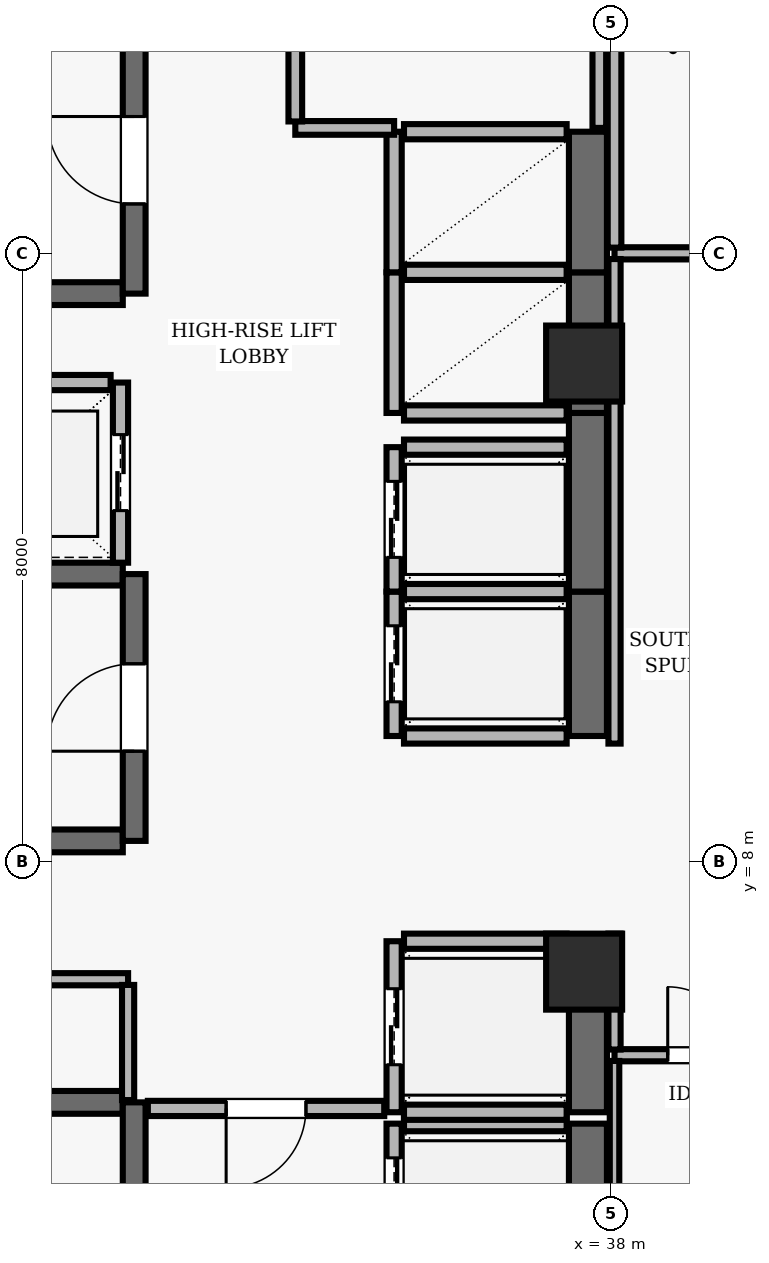
"""IFC4 building model, lengths in metres.
Left out: names, types, materials, properties, quantities, classifications, styles, units other than length and angle.
Written with IfcOpenShell. Run it as: python <this file> out.ifc"""

import sys

from ifc_helpers import new_model, si_unit, direction, frame, frame_2d, origin, origin_2d, place, context, subcontext, project, spatial, rectangle, extrude, element, fill, save


model = new_model("IFC4")
c1 = context("Model", 3, precision=1e-05, world=origin(), true_north=direction((0.0, 1.0)))
c2 = subcontext(c1, "Body", "Model", "MODEL_VIEW")
j1 = project(units=[si_unit("LENGTHUNIT", "METRE"), si_unit("PLANEANGLEUNIT", "RADIAN")], contexts=[c1])
p1 = place(None, origin())
s1 = spatial("IfcSite", under=j1, at=p1, CompositionType="ELEMENT")
p2 = place(p1, origin())
s2 = spatial("IfcBuilding", under=s1, at=p2, CompositionType="ELEMENT")
p3 = place(p2, frame((0.0, 0.0, 214.8)))
s3 = spatial("IfcBuildingStorey", under=s2, at=p3, CompositionType="ELEMENT", Elevation=214.8)
for number, where, z_axis, x_axis in (
    (1, (37.65, 6.55, 0.0), (0.0, 0.0, 1.0), (1.0, 0.0, 0.0)),
    (2, (37.65, 14.55, 0.0), (0.0, 0.0, 1.0), (1.0, 0.0, 0.0)),
):
    element("IfcColumn", number, at=place(p3, frame(where, z_axis=z_axis, x_axis=x_axis)), inside=s3, PredefinedType="COLUMN", context=c2, shape_type="SweptSolid", body=[
        extrude(rectangle(XDim=1.0, YDim=1.0, at=origin_2d()), origin(), (0.0, 0.0, 1.0), 3.9),
    ])
p4 = place(p3, frame((31.58, 4.83, 0.0), z_axis=(0.0, 0.0, 1.0), x_axis=(-1.0, 0.0, 0.0)))
e3 = element("IfcWall", 3, at=p4, inside=s3, PredefinedType="SHEAR", context=c2, shape_type="SweptSolid", body=[
    extrude(rectangle(XDim=8.36, YDim=0.3, at=frame_2d((4.18, 0.0))), origin(), (0.0, 0.0, 1.0), 3.69),
])
p5 = place(p3, frame((31.73, 0.96, 0.0), z_axis=(0.0, 0.0, 1.0), x_axis=(0.0, 1.0, 0.0)))
e4 = element("IfcWall", 4, at=p5, inside=s3, PredefinedType="SHEAR", context=c2, shape_type="SweptSolid", body=[
    extrude(rectangle(XDim=3.87, YDim=0.3, at=frame_2d((1.935, 0.0))), origin(), (0.0, 0.0, 1.0), 3.69),
])
p6 = place(p5, frame((1.54, 0.0, 0.0)))
e5 = element("IfcOpeningElement", 5, at=p6, cuts=e4, PredefinedType="OPENING", context=c2, shape_type="SweptSolid", body=[
    extrude(rectangle(XDim=1.15, YDim=2.15, at=frame_2d((0.575, 1.075))), frame((0.0, 0.16, 0.0), z_axis=(0.0, -1.0, 0.0), x_axis=(1.0, 0.0, 0.0)), (0.0, 0.0, 1.0), 0.32),
])
p7 = place(p3, frame((23.22, 15.47, 0.0), z_axis=(0.0, 0.0, 1.0), x_axis=(1.0, 0.0, 0.0)))
e6 = element("IfcWall", 6, at=p7, inside=s3, PredefinedType="SHEAR", context=c2, shape_type="SweptSolid", body=[
    extrude(rectangle(XDim=8.36, YDim=0.3, at=frame_2d((4.18, 0.0))), origin(), (0.0, 0.0, 1.0), 3.69),
])
p8 = place(p3, frame((31.73, 15.47, 0.0), z_axis=(0.0, 0.0, 1.0), x_axis=(0.0, 1.0, 0.0)))
e7 = element("IfcWall", 7, at=p8, inside=s3, PredefinedType="SHEAR", context=c2, shape_type="SweptSolid", body=[
    extrude(rectangle(XDim=3.51, YDim=0.3, at=frame_2d((1.755, 0.0))), origin(), (0.0, 0.0, 1.0), 3.69),
])
p9 = place(p8, frame((1.18, 0.0, 0.0)))
e8 = element("IfcOpeningElement", 8, at=p9, cuts=e7, PredefinedType="OPENING", context=c2, shape_type="SweptSolid", body=[
    extrude(rectangle(XDim=1.15, YDim=2.15, at=frame_2d((0.575, 1.075))), frame((0.0, 0.16, 0.0), z_axis=(0.0, -1.0, 0.0), x_axis=(1.0, 0.0, 0.0)), (0.0, 0.0, 1.0), 0.32),
])
for number, where, z_axis, x_axis in (
    (9, (31.58, 11.78, 0.0), (0.0, 0.0, 1.0), (-1.0, 0.0, 0.0)),
    (10, (23.22, 8.27, 0.0), (0.0, 0.0, 1.0), (1.0, 0.0, 0.0)),
):
    element("IfcWall", number, at=place(p3, frame(where, z_axis=z_axis, x_axis=x_axis)), inside=s3, PredefinedType="SHEAR", context=c2, shape_type="SweptSolid", body=[
        extrude(rectangle(XDim=8.36, YDim=0.3, at=frame_2d((4.18, 0.0))), origin(), (0.0, 0.0, 1.0), 3.69),
    ])
p10 = place(p3, frame((31.73, 8.27, 0.0), z_axis=(0.0, 0.0, 1.0), x_axis=(0.0, 1.0, 0.0)))
e11 = element("IfcWall", 11, at=p10, inside=s3, PredefinedType="SHEAR", context=c2, shape_type="SweptSolid", body=[
    extrude(rectangle(XDim=3.51, YDim=0.3, at=frame_2d((1.755, 0.0))), origin(), (0.0, 0.0, 1.0), 3.69),
])
p11 = place(p10, frame((1.18, 0.0, 0.0)))
e12 = element("IfcOpeningElement", 12, at=p11, cuts=e11, PredefinedType="OPENING", context=c2, shape_type="SweptSolid", body=[
    extrude(rectangle(XDim=1.15, YDim=2.15, at=frame_2d((0.575, 1.075))), frame((0.0, 0.16, 0.0), z_axis=(0.0, -1.0, 0.0), x_axis=(1.0, 0.0, 0.0)), (0.0, 0.0, 1.0), 0.32),
])
p12 = place(p3, frame((35.15, 4.55, 0.0), z_axis=(0.0, 0.0, 1.0), x_axis=(0.0, -1.0, 0.0)))
e13 = element("IfcWall", 13, at=p12, inside=s3, PredefinedType="SOLIDWALL", context=c2, shape_type="SweptSolid", body=[
    extrude(rectangle(XDim=2.1, YDim=0.2, at=frame_2d((1.05, 0.0))), origin(), (0.0, 0.0, 1.0), 3.69),
])
p13 = place(p12, frame((0.45, 0.0, 0.0)))
e14 = element("IfcOpeningElement", 14, at=p13, cuts=e13, PredefinedType="OPENING", context=c2, shape_type="SweptSolid", body=[
    extrude(rectangle(XDim=1.2, YDim=2.15, at=frame_2d((0.6, 1.075))), frame((0.0, 0.11, 0.0), z_axis=(0.0, -1.0, 0.0), x_axis=(1.0, 0.0, 0.0)), (0.0, 0.0, 1.0), 0.22),
])
p14 = place(p3, frame((37.7, 2.45, 0.0), z_axis=(0.0, 0.0, 1.0), x_axis=(0.0, 1.0, 0.0)))
e15 = element("IfcWall", 15, at=p14, inside=s3, PredefinedType="SHEAR", context=c2, shape_type="SweptSolid", body=[
    extrude(rectangle(XDim=2.1, YDim=0.5, at=frame_2d((1.05, 0.0))), origin(), (0.0, 0.0, 1.0), 3.69),
])
p15 = place(p3, frame((37.42, 4.55, 0.0), z_axis=(0.0, 0.0, 1.0), x_axis=(-1.0, 0.0, 0.0)))
e16 = element("IfcWall", 16, at=p15, inside=s3, PredefinedType="SOLIDWALL", context=c2, shape_type="SweptSolid", body=[
    extrude(rectangle(XDim=2.14, YDim=0.2, at=frame_2d((1.07, 0.0))), origin(), (0.0, 0.0, 1.0), 3.69),
])
p16 = place(p3, frame((35.15, 6.95, 0.0), z_axis=(0.0, 0.0, 1.0), x_axis=(0.0, -1.0, 0.0)))
e17 = element("IfcWall", 17, at=p16, inside=s3, PredefinedType="SOLIDWALL", context=c2, shape_type="SweptSolid", body=[
    extrude(rectangle(XDim=2.25, YDim=0.2, at=frame_2d((1.125, 0.0))), origin(), (0.0, 0.0, 1.0), 3.69),
])
p17 = place(p16, frame((0.625, 0.0, 0.0)))
e18 = element("IfcOpeningElement", 18, at=p17, cuts=e17, PredefinedType="OPENING", context=c2, shape_type="SweptSolid", body=[
    extrude(rectangle(XDim=1.0, YDim=2.1, at=frame_2d((0.5, 1.05))), frame((0.0, 0.11, 0.0), z_axis=(0.0, -1.0, 0.0), x_axis=(1.0, 0.0, 0.0)), (0.0, 0.0, 1.0), 0.22),
])
p18 = place(p3, frame((37.7, 4.7, 0.0), z_axis=(0.0, 0.0, 1.0), x_axis=(0.0, 1.0, 0.0)))
e19 = element("IfcWall", 19, at=p18, inside=s3, PredefinedType="SHEAR", context=c2, shape_type="SweptSolid", body=[
    extrude(rectangle(XDim=2.25, YDim=0.5, at=frame_2d((1.125, 0.0))), origin(), (0.0, 0.0, 1.0), 3.69),
])
for number, where, z_axis, x_axis in (
    (20, (35.28, 4.7, 0.0), (0.0, 0.0, 1.0), (1.0, 0.0, 0.0)),
    (21, (37.42, 6.95, 0.0), (0.0, 0.0, 1.0), (-1.0, 0.0, 0.0)),
):
    element("IfcWall", number, at=place(p3, frame(where, z_axis=z_axis, x_axis=x_axis)), inside=s3, PredefinedType="SOLIDWALL", context=c2, shape_type="SweptSolid", body=[
        extrude(rectangle(XDim=2.14, YDim=0.2, at=frame_2d((1.07, 0.0))), origin(), (0.0, 0.0, 1.0), 3.69),
    ])
p19 = place(p3, frame((35.15, 11.55, 0.0), z_axis=(0.0, 0.0, 1.0), x_axis=(0.0, -1.0, 0.0)))
e22 = element("IfcWall", 22, at=p19, inside=s3, PredefinedType="SOLIDWALL", context=c2, shape_type="SweptSolid", body=[
    extrude(rectangle(XDim=1.9, YDim=0.2, at=frame_2d((0.95, 0.0))), origin(), (0.0, 0.0, 1.0), 3.69),
])
p20 = place(p19, frame((0.45, 0.0, 0.0)))
e23 = element("IfcOpeningElement", 23, at=p20, cuts=e22, PredefinedType="OPENING", context=c2, shape_type="SweptSolid", body=[
    extrude(rectangle(XDim=1.0, YDim=2.1, at=frame_2d((0.5, 1.05))), frame((0.0, 0.11, 0.0), z_axis=(0.0, -1.0, 0.0), x_axis=(1.0, 0.0, 0.0)), (0.0, 0.0, 1.0), 0.22),
])
p21 = place(p3, frame((37.7, 9.65, 0.0), z_axis=(0.0, 0.0, 1.0), x_axis=(0.0, 1.0, 0.0)))
e24 = element("IfcWall", 24, at=p21, inside=s3, PredefinedType="SHEAR", context=c2, shape_type="SweptSolid", body=[
    extrude(rectangle(XDim=1.9, YDim=0.5, at=frame_2d((0.95, 0.0))), origin(), (0.0, 0.0, 1.0), 3.69),
])
for number, where, z_axis, x_axis in (
    (25, (35.28, 9.65, 0.0), (0.0, 0.0, 1.0), (1.0, 0.0, 0.0)),
    (26, (37.42, 11.55, 0.0), (0.0, 0.0, 1.0), (-1.0, 0.0, 0.0)),
):
    element("IfcWall", number, at=place(p3, frame(where, z_axis=z_axis, x_axis=x_axis)), inside=s3, PredefinedType="SOLIDWALL", context=c2, shape_type="SweptSolid", body=[
        extrude(rectangle(XDim=2.14, YDim=0.2, at=frame_2d((1.07, 0.0))), origin(), (0.0, 0.0, 1.0), 3.69),
    ])
p22 = place(p3, frame((35.15, 13.45, 0.0), z_axis=(0.0, 0.0, 1.0), x_axis=(0.0, -1.0, 0.0)))
e27 = element("IfcWall", 27, at=p22, inside=s3, PredefinedType="SOLIDWALL", context=c2, shape_type="SweptSolid", body=[
    extrude(rectangle(XDim=1.9, YDim=0.2, at=frame_2d((0.95, 0.0))), origin(), (0.0, 0.0, 1.0), 3.69),
])
p23 = place(p22, frame((0.45, 0.0, 0.0)))
e28 = element("IfcOpeningElement", 28, at=p23, cuts=e27, PredefinedType="OPENING", context=c2, shape_type="SweptSolid", body=[
    extrude(rectangle(XDim=1.0, YDim=2.1, at=frame_2d((0.5, 1.05))), frame((0.0, 0.11, 0.0), z_axis=(0.0, -1.0, 0.0), x_axis=(1.0, 0.0, 0.0)), (0.0, 0.0, 1.0), 0.22),
])
p24 = place(p3, frame((37.7, 11.55, 0.0), z_axis=(0.0, 0.0, 1.0), x_axis=(0.0, 1.0, 0.0)))
e29 = element("IfcWall", 29, at=p24, inside=s3, PredefinedType="SHEAR", context=c2, shape_type="SweptSolid", body=[
    extrude(rectangle(XDim=2.35, YDim=0.5, at=frame_2d((1.175, 0.0))), origin(), (0.0, 0.0, 1.0), 3.69),
])
p25 = place(p3, frame((37.42, 13.45, 0.0), z_axis=(0.0, 0.0, 1.0), x_axis=(-1.0, 0.0, 0.0)))
e30 = element("IfcWall", 30, at=p25, inside=s3, PredefinedType="SOLIDWALL", context=c2, shape_type="SweptSolid", body=[
    extrude(rectangle(XDim=2.14, YDim=0.2, at=frame_2d((1.07, 0.0))), origin(), (0.0, 0.0, 1.0), 3.69),
])
p26 = place(p3, frame((31.55, 11.93, 0.0), z_axis=(0.0, 0.0, 1.0), x_axis=(0.0, 1.0, 0.0)))
e31 = element("IfcWall", 31, at=p26, inside=s3, PredefinedType="SOLIDWALL", context=c2, shape_type="SweptSolid", body=[
    extrude(rectangle(XDim=2.37, YDim=0.2, at=frame_2d((1.185, 0.0))), origin(), (0.0, 0.0, 1.0), 3.69),
])
p27 = place(p26, frame((0.685, 0.0, 0.0)))
e32 = element("IfcOpeningElement", 32, at=p27, cuts=e31, PredefinedType="OPENING", context=c2, shape_type="SweptSolid", body=[
    extrude(rectangle(XDim=1.0, YDim=2.1, at=frame_2d((0.5, 1.05))), frame((0.0, 0.11, 0.0), z_axis=(0.0, -1.0, 0.0), x_axis=(1.0, 0.0, 0.0)), (0.0, 0.0, 1.0), 0.22),
])
p28 = place(p3, frame((31.42, 14.3, 0.0), z_axis=(0.0, 0.0, 1.0), x_axis=(-1.0, 0.0, 0.0)))
e33 = element("IfcWall", 33, at=p28, inside=s3, PredefinedType="SOLIDWALL", context=c2, shape_type="SweptSolid", body=[
    extrude(rectangle(XDim=2.44, YDim=0.2, at=frame_2d((1.22, 0.0))), origin(), (0.0, 0.0, 1.0), 3.69),
])
p29 = place(p3, frame((35.15, 15.75, 0.0), z_axis=(0.0, 0.0, 1.0), x_axis=(0.0, -1.0, 0.0)))
e34 = element("IfcWall", 34, at=p29, inside=s3, PredefinedType="SOLIDWALL", context=c2, shape_type="SweptSolid", body=[
    extrude(rectangle(XDim=1.85, YDim=0.2, at=frame_2d((0.925, 0.0))), origin(), (0.0, 0.0, 1.0), 3.69),
])
p30 = place(p3, frame((37.7, 13.9, 0.0), z_axis=(0.0, 0.0, 1.0), x_axis=(0.0, 1.0, 0.0)))
e35 = element("IfcWall", 35, at=p30, inside=s3, PredefinedType="SHEAR", context=c2, shape_type="SweptSolid", body=[
    extrude(rectangle(XDim=1.85, YDim=0.5, at=frame_2d((0.925, 0.0))), origin(), (0.0, 0.0, 1.0), 3.69),
])
for number, where, z_axis, x_axis in (
    (36, (35.28, 13.9, 0.0), (0.0, 0.0, 1.0), (1.0, 0.0, 0.0)),
    (37, (37.42, 15.75, 0.0), (0.0, 0.0, 1.0), (-1.0, 0.0, 0.0)),
):
    element("IfcWall", number, at=place(p3, frame(where, z_axis=z_axis, x_axis=x_axis)), inside=s3, PredefinedType="SOLIDWALL", context=c2, shape_type="SweptSolid", body=[
        extrude(rectangle(XDim=2.14, YDim=0.2, at=frame_2d((1.07, 0.0))), origin(), (0.0, 0.0, 1.0), 3.69),
    ])
p31 = place(p3, frame((35.15, 17.6, 0.0), z_axis=(0.0, 0.0, 1.0), x_axis=(0.0, -1.0, 0.0)))
e38 = element("IfcWall", 38, at=p31, inside=s3, PredefinedType="SOLIDWALL", context=c2, shape_type="SweptSolid", body=[
    extrude(rectangle(XDim=1.85, YDim=0.2, at=frame_2d((0.925, 0.0))), origin(), (0.0, 0.0, 1.0), 3.69),
])
p32 = place(p3, frame((37.7, 15.75, 0.0), z_axis=(0.0, 0.0, 1.0), x_axis=(0.0, 1.0, 0.0)))
e39 = element("IfcWall", 39, at=p32, inside=s3, PredefinedType="SHEAR", context=c2, shape_type="SweptSolid", body=[
    extrude(rectangle(XDim=1.85, YDim=0.5, at=frame_2d((0.925, 0.0))), origin(), (0.0, 0.0, 1.0), 3.69),
])
p33 = place(p3, frame((37.42, 17.6, 0.0), z_axis=(0.0, 0.0, 1.0), x_axis=(-1.0, 0.0, 0.0)))
e40 = element("IfcWall", 40, at=p33, inside=s3, PredefinedType="SOLIDWALL", context=c2, shape_type="SweptSolid", body=[
    extrude(rectangle(XDim=2.14, YDim=0.2, at=frame_2d((1.07, 0.0))), origin(), (0.0, 0.0, 1.0), 3.69),
])
p34 = place(p3, frame((28.55, 6.45, 0.0), z_axis=(0.0, 0.0, 1.0), x_axis=(1.0, 0.0, 0.0)))
e41 = element("IfcWall", 41, at=p34, inside=s3, PredefinedType="PARTITIONING", context=c2, shape_type="SweptSolid", body=[
    extrude(rectangle(XDim=3.1, YDim=0.16, at=frame_2d((1.55, 0.0))), origin(), (0.0, 0.0, 1.0), 3.69),
])
p35 = place(p34, frame((1.11, 0.0, 0.0)))
e42 = element("IfcOpeningElement", 42, at=p35, cuts=e41, PredefinedType="OPENING", context=c2, shape_type="SweptSolid", body=[
    extrude(rectangle(XDim=0.88, YDim=2.1, at=frame_2d((0.44, 1.05))), frame((0.0, 0.09, 0.0), z_axis=(0.0, -1.0, 0.0), x_axis=(1.0, 0.0, 0.0)), (0.0, 0.0, 1.0), 0.18),
])
p36 = place(p3, frame((33.85, 17.65, 0.0), z_axis=(0.0, 0.0, 1.0), x_axis=(1.0, 0.0, 0.0)))
e43 = element("IfcWall", 43, at=p36, inside=s3, PredefinedType="PARTITIONING", context=c2, shape_type="SweptSolid", body=[
    extrude(rectangle(XDim=1.3, YDim=0.18, at=frame_2d((0.65, 0.0))), origin(), (0.0, 0.0, 1.0), 3.69),
])
p37 = place(p3, frame((35.02, 4.75, 0.0), z_axis=(0.0, 0.0, 1.0), x_axis=(-1.0, 0.0, 0.0)))
e44 = element("IfcWall", 44, at=p37, inside=s3, PredefinedType="SOLIDWALL", context=c2, shape_type="SweptSolid", body=[
    extrude(rectangle(XDim=3.11, YDim=0.2, at=frame_2d((1.555, 0.0))), origin(), (0.0, 0.0, 1.0), 3.69),
])
p38 = place(p37, frame((1.03, 0.0, 0.0)))
e45 = element("IfcOpeningElement", 45, at=p38, cuts=e44, PredefinedType="OPENING", context=c2, shape_type="SweptSolid", body=[
    extrude(rectangle(XDim=1.05, YDim=2.15, at=frame_2d((0.525, 1.075))), frame((0.0, 0.11, 0.0), z_axis=(0.0, -1.0, 0.0), x_axis=(1.0, 0.0, 0.0)), (0.0, 0.0, 1.0), 0.22),
])
p39 = place(p3, frame((38.05, 5.45, 0.0), z_axis=(0.0, 0.0, 1.0), x_axis=(1.0, 0.0, 0.0)))
e46 = element("IfcWall", 46, at=p39, inside=s3, PredefinedType="PARTITIONING", context=c2, shape_type="SweptSolid", body=[
    extrude(rectangle(XDim=2.3, YDim=0.16, at=frame_2d((1.15, 0.0))), origin(), (0.0, 0.0, 1.0), 3.343),
])
p40 = place(p39, frame((0.7, 0.0, 0.0)))
e47 = element("IfcOpeningElement", 47, at=p40, cuts=e46, PredefinedType="OPENING", context=c2, shape_type="SweptSolid", body=[
    extrude(rectangle(XDim=0.9, YDim=2.1, at=frame_2d((0.45, 1.05))), frame((0.0, 0.09, 0.0), z_axis=(0.0, -1.0, 0.0), x_axis=(1.0, 0.0, 0.0)), (0.0, 0.0, 1.0), 0.18),
])
p41 = place(p3, frame((40.35, 16.0, 0.0), z_axis=(0.0, 0.0, 1.0), x_axis=(-1.0, 0.0, 0.0)))
e48 = element("IfcWall", 48, at=p41, inside=s3, PredefinedType="PARTITIONING", context=c2, shape_type="SweptSolid", body=[
    extrude(rectangle(XDim=2.3, YDim=0.16, at=frame_2d((1.15, 0.0))), origin(), (0.0, 0.0, 1.0), 3.39),
])
p42 = place(p41, frame((0.35, 0.0, 0.0)))
e49 = element("IfcOpeningElement", 49, at=p42, cuts=e48, PredefinedType="OPENING", context=c2, shape_type="SweptSolid", body=[
    extrude(rectangle(XDim=0.9, YDim=2.1, at=frame_2d((0.45, 1.05))), frame((0.0, 0.09, 0.0), z_axis=(0.0, -1.0, 0.0), x_axis=(1.0, 0.0, 0.0)), (0.0, 0.0, 1.0), 0.18),
])
p43 = place(p3, frame((31.65, 4.86, 0.0), z_axis=(0.0, 0.0, 1.0), x_axis=(0.0, 1.0, 0.0)))
e50 = element("IfcWall", 50, at=p43, inside=s3, PredefinedType="PARTITIONING", context=c2, shape_type="SweptSolid", body=[
    extrude(rectangle(XDim=1.515, YDim=0.16, at=frame_2d((0.757, 0.0))), origin(), (0.0, 0.0, 1.0), 3.69),
])
p44 = place(p3, frame((33.85, 17.735, 0.0), z_axis=(0.0, 0.0, 1.0), x_axis=(0.0, 1.0, 0.0)))
e51 = element("IfcWall", 51, at=p44, inside=s3, PredefinedType="PARTITIONING", context=c2, shape_type="SweptSolid", body=[
    extrude(rectangle(XDim=6.03, YDim=0.18, at=frame_2d((3.015, 0.0))), origin(), (0.0, 0.0, 1.0), 3.69),
])
p45 = place(p44, frame((2.54, 0.0, 0.0)))
e52 = element("IfcOpeningElement", 52, at=p45, cuts=e51, PredefinedType="OPENING", context=c2, shape_type="SweptSolid", body=[
    extrude(rectangle(XDim=0.95, YDim=2.1, at=frame_2d((0.475, 1.05))), frame((0.0, 0.1, 0.0), z_axis=(0.0, -1.0, 0.0), x_axis=(1.0, 0.0, 0.0)), (0.0, 0.0, 1.0), 0.2),
])
p46 = place(p3, frame((37.85, 17.65, 0.0), z_axis=(0.0, 0.0, 1.0), x_axis=(0.0, 1.0, 0.0)))
e53 = element("IfcWall", 53, at=p46, inside=s3, PredefinedType="PARTITIONING", context=c2, shape_type="SweptSolid", body=[
    extrude(rectangle(XDim=4.55, YDim=0.18, at=frame_2d((2.275, 0.0))), origin(), (0.0, 0.0, 1.0), 3.139),
])
p47 = place(p3, frame((38.05, 5.375, 0.0), z_axis=(0.0, 0.0, 1.0), x_axis=(0.0, -1.0, 0.0)))
e54 = element("IfcWall", 54, at=p47, inside=s3, PredefinedType="PARTITIONING", context=c2, shape_type="SweptSolid", body=[
    extrude(rectangle(XDim=5.23, YDim=0.125, at=frame_2d((2.615, 0.0))), origin(), (0.0, 0.0, 1.0), 3.139),
])
p48 = place(p3, frame((38.05, 7.05, 0.0), z_axis=(0.0, 0.0, 1.0), x_axis=(0.0, -1.0, 0.0)))
e55 = element("IfcWall", 55, at=p48, inside=s3, PredefinedType="PARTITIONING", context=c2, shape_type="SweptSolid", body=[
    extrude(rectangle(XDim=1.525, YDim=0.16, at=frame_2d((0.763, 0.0))), origin(), (0.0, 0.0, 1.0), 3.139),
])
p49 = place(p3, frame((38.05, 15.925, 0.0), z_axis=(0.0, 0.0, 1.0), x_axis=(0.0, -1.0, 0.0)))
e56 = element("IfcWall", 56, at=p49, inside=s3, PredefinedType="PARTITIONING", context=c2, shape_type="SweptSolid", body=[
    extrude(rectangle(XDim=6.375, YDim=0.16, at=frame_2d((3.188, 0.0))), origin(), (0.0, 0.0, 1.0), 3.139),
])
p50 = place(p3, frame((38.05, 22.055, 0.0), z_axis=(0.0, 0.0, 1.0), x_axis=(0.0, -1.0, 0.0)))
e57 = element("IfcWall", 57, at=p50, inside=s3, PredefinedType="PARTITIONING", context=c2, shape_type="SweptSolid", body=[
    extrude(rectangle(XDim=5.98, YDim=0.18, at=frame_2d((2.99, 0.0))), origin(), (0.0, 0.0, 1.0), 3.139),
])
p51 = place(p9, origin())
e58 = element("IfcDoor", 58, at=p51, inside=s3, OperationType="SINGLE_SWING_RIGHT", PredefinedType="DOOR", context=c2, shape_type="SweptSolid", body=[
    extrude(rectangle(XDim=1.15, YDim=2.15, at=frame_2d((0.575, 1.075))), frame((0.0, 0.025, 0.0), z_axis=(0.0, -1.0, 0.0), x_axis=(1.0, 0.0, 0.0)), (0.0, 0.0, 1.0), 0.05),
])
fill(e8, e58)
p52 = place(p11, origin())
e59 = element("IfcDoor", 59, at=p52, inside=s3, OperationType="SINGLE_SWING_LEFT", PredefinedType="DOOR", context=c2, shape_type="SweptSolid", body=[
    extrude(rectangle(XDim=1.15, YDim=2.15, at=frame_2d((0.575, 1.075))), frame((0.0, 0.025, 0.0), z_axis=(0.0, -1.0, 0.0), x_axis=(1.0, 0.0, 0.0)), (0.0, 0.0, 1.0), 0.05),
])
fill(e12, e59)
p53 = place(p13, origin())
e60 = element("IfcDoor", 60, at=p53, inside=s3, OperationType="DOUBLE_DOOR_SLIDING", PredefinedType="DOOR", context=c2, shape_type="SweptSolid", body=[
    extrude(rectangle(XDim=1.2, YDim=2.15, at=frame_2d((0.6, 1.075))), frame((0.0, 0.025, 0.0), z_axis=(0.0, -1.0, 0.0), x_axis=(1.0, 0.0, 0.0)), (0.0, 0.0, 1.0), 0.05),
])
fill(e14, e60)
p54 = place(p17, origin())
e61 = element("IfcDoor", 61, at=p54, inside=s3, OperationType="DOUBLE_DOOR_SLIDING", PredefinedType="DOOR", context=c2, shape_type="SweptSolid", body=[
    extrude(rectangle(XDim=1.0, YDim=2.1, at=frame_2d((0.5, 1.05))), frame((0.0, 0.025, 0.0), z_axis=(0.0, -1.0, 0.0), x_axis=(1.0, 0.0, 0.0)), (0.0, 0.0, 1.0), 0.05),
])
fill(e18, e61)
p55 = place(p20, origin())
e62 = element("IfcDoor", 62, at=p55, inside=s3, OperationType="DOUBLE_DOOR_SLIDING", PredefinedType="DOOR", context=c2, shape_type="SweptSolid", body=[
    extrude(rectangle(XDim=1.0, YDim=2.1, at=frame_2d((0.5, 1.05))), frame((0.0, 0.025, 0.0), z_axis=(0.0, -1.0, 0.0), x_axis=(1.0, 0.0, 0.0)), (0.0, 0.0, 1.0), 0.05),
])
fill(e23, e62)
p56 = place(p23, origin())
e63 = element("IfcDoor", 63, at=p56, inside=s3, OperationType="DOUBLE_DOOR_SLIDING", PredefinedType="DOOR", context=c2, shape_type="SweptSolid", body=[
    extrude(rectangle(XDim=1.0, YDim=2.1, at=frame_2d((0.5, 1.05))), frame((0.0, 0.025, 0.0), z_axis=(0.0, -1.0, 0.0), x_axis=(1.0, 0.0, 0.0)), (0.0, 0.0, 1.0), 0.05),
])
fill(e28, e63)
p57 = place(p27, origin())
e64 = element("IfcDoor", 64, at=p57, inside=s3, OperationType="DOUBLE_DOOR_SLIDING", PredefinedType="DOOR", context=c2, shape_type="SweptSolid", body=[
    extrude(rectangle(XDim=1.0, YDim=2.1, at=frame_2d((0.5, 1.05))), frame((0.0, 0.025, 0.0), z_axis=(0.0, -1.0, 0.0), x_axis=(1.0, 0.0, 0.0)), (0.0, 0.0, 1.0), 0.05),
])
fill(e32, e64)
p58 = place(p38, origin())
e65 = element("IfcDoor", 65, at=p58, inside=s3, OperationType="SINGLE_SWING_RIGHT", PredefinedType="DOOR", context=c2, shape_type="SweptSolid", body=[
    extrude(rectangle(XDim=1.05, YDim=2.15, at=frame_2d((0.525, 1.075))), frame((0.0, 0.025, 0.0), z_axis=(0.0, -1.0, 0.0), x_axis=(1.0, 0.0, 0.0)), (0.0, 0.0, 1.0), 0.05),
])
fill(e45, e65)
p59 = place(p40, origin())
e66 = element("IfcDoor", 66, at=p59, inside=s3, OperationType="SINGLE_SWING_LEFT", PredefinedType="DOOR", context=c2, shape_type="SweptSolid", body=[
    extrude(rectangle(XDim=0.9, YDim=2.1, at=frame_2d((0.45, 1.05))), frame((0.0, 0.025, 0.0), z_axis=(0.0, -1.0, 0.0), x_axis=(1.0, 0.0, 0.0)), (0.0, 0.0, 1.0), 0.05),
])
fill(e47, e66)
save(model, sys.argv[1])
